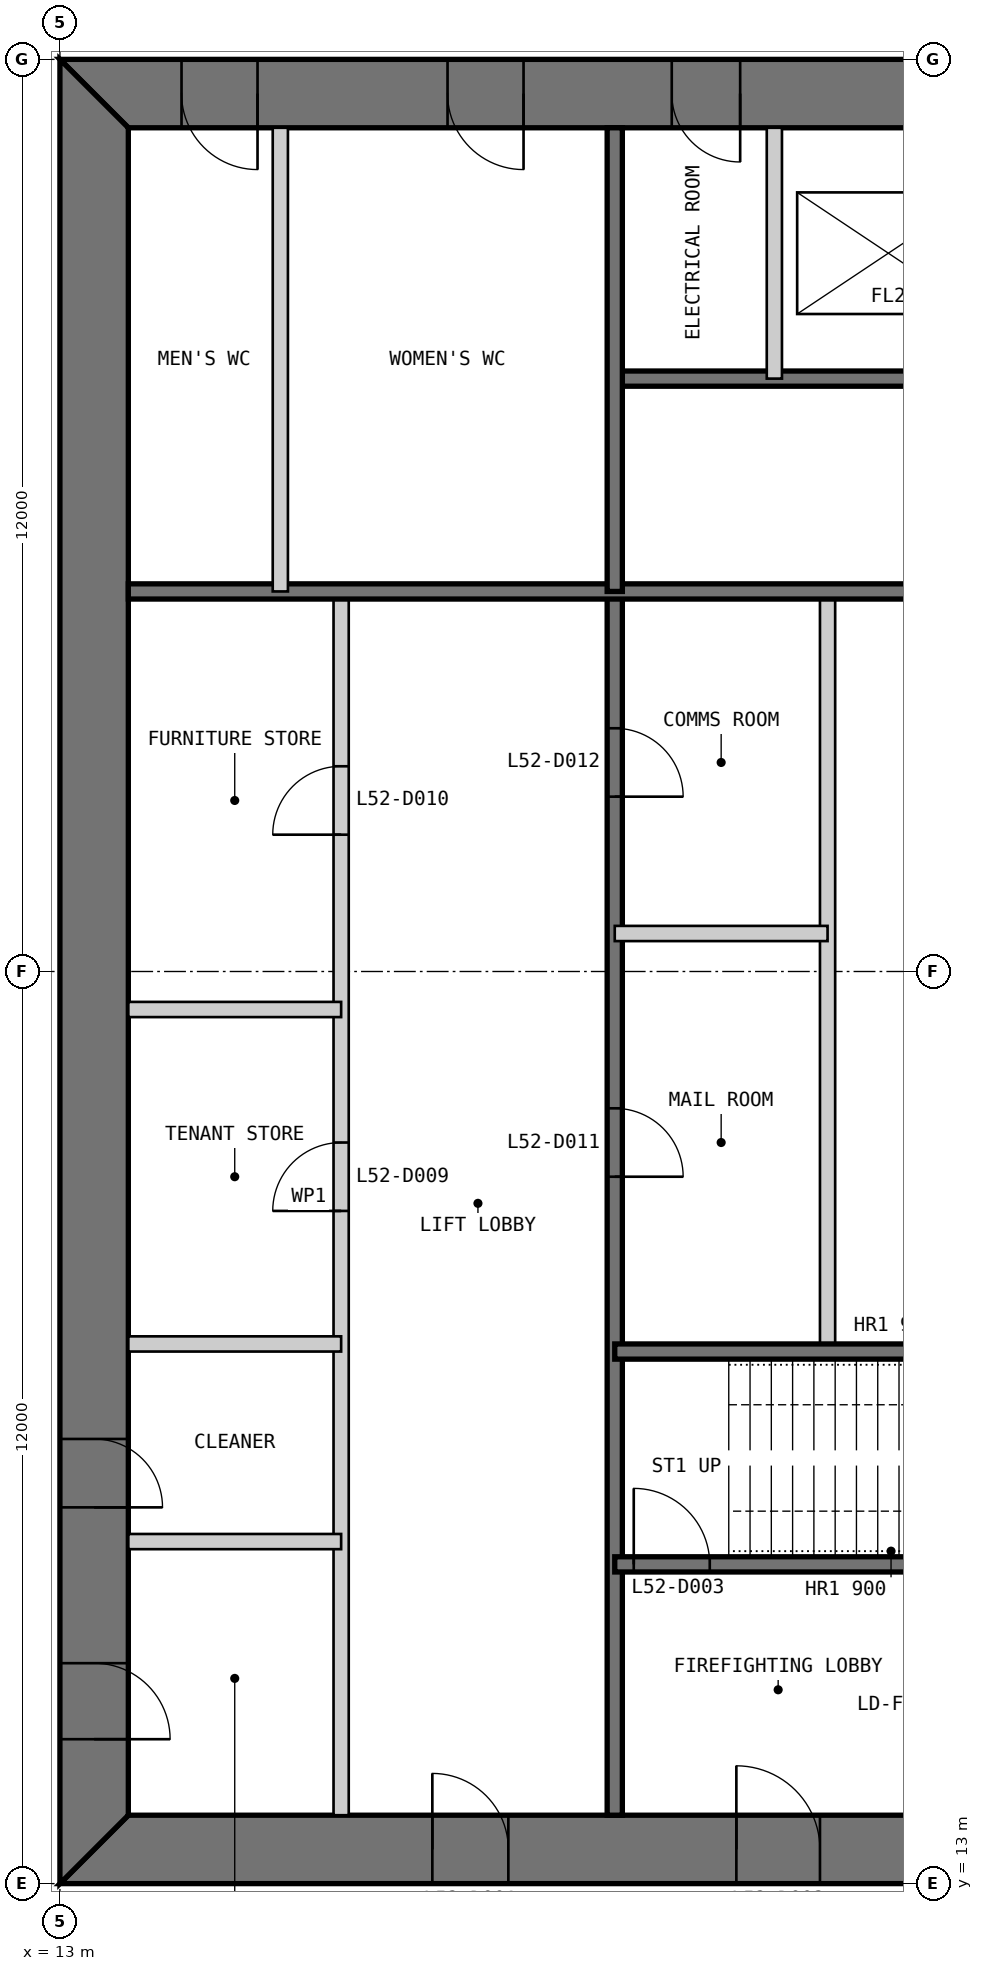
"""IFC4 building model, lengths in metres.
Left out: names, types, materials, properties, quantities, classifications, styles, units other than length and angle.
Written with IfcOpenShell. Run it as: python <this file> out.ifc"""

import sys

from ifc_helpers import new_model, si_unit, direction, frame, frame_2d, origin, place, context, subcontext, project, spatial, polyline, rectangle, outline, extrude, element, fill, save


model = new_model("IFC4")
c1 = context("Model", 3, precision=1e-05, world=origin(), true_north=direction((0.0, 1.0)))
c2 = subcontext(c1, "Body", "Model", "MODEL_VIEW")
j1 = project(units=[si_unit("LENGTHUNIT", "METRE"), si_unit("PLANEANGLEUNIT", "RADIAN")], contexts=[c1])
p1 = place(None, origin())
s1 = spatial("IfcSite", under=j1, at=p1, CompositionType="ELEMENT")
p2 = place(p1, origin())
s2 = spatial("IfcBuilding", under=s1, at=p2, CompositionType="ELEMENT")
p3 = place(p2, frame((0.0, 0.0, 221.8)))
s3 = spatial("IfcBuildingStorey", under=s2, at=p3, CompositionType="ELEMENT", Elevation=221.8)
p4 = place(p3, frame((13.0, 13.45, 0.0), z_axis=(0.0, 0.0, 1.0), x_axis=(1.0, 0.0, 0.0)))
e1 = element("IfcWall", 1, at=p4, inside=s3, PredefinedType="SHEAR", context=c2, shape_type="SweptSolid", body=[
    extrude(outline(polyline([(0.0, -0.45), (24.0, -0.45), (23.1, 0.45), (0.9, 0.45), (0.0, -0.45)])), origin(), (0.0, 0.0, 1.0), 4.0),
])
p5 = place(p4, frame((4.9, 0.0, 0.0)))
e2 = element("IfcOpeningElement", 2, at=p5, cuts=e1, PredefinedType="OPENING", context=c2, shape_type="SweptSolid", body=[
    extrude(rectangle(XDim=1.0, YDim=2.2, at=frame_2d((0.5, 1.1))), frame((0.0, 0.46, 0.0), z_axis=(0.0, -1.0, 0.0), x_axis=(1.0, 0.0, 0.0)), (0.0, 0.0, 1.0), 0.92),
])
p6 = place(p4, frame((8.9, 0.0, 0.0)))
e3 = element("IfcOpeningElement", 3, at=p6, cuts=e1, PredefinedType="OPENING", context=c2, shape_type="SweptSolid", body=[
    extrude(rectangle(XDim=1.1, YDim=2.2, at=frame_2d((0.55, 1.1))), frame((0.0, 0.46, 0.0), z_axis=(0.0, -1.0, 0.0), x_axis=(1.0, 0.0, 0.0)), (0.0, 0.0, 1.0), 0.92),
])
p7 = place(p4, frame((15.05, 0.0, 0.0)))
e4 = element("IfcOpeningElement", 4, at=p7, cuts=e1, PredefinedType="OPENING", context=c2, shape_type="SweptSolid", body=[
    extrude(rectangle(XDim=0.9, YDim=2.2, at=frame_2d((0.45, 1.1))), frame((0.0, 0.46, 0.0), z_axis=(0.0, -1.0, 0.0), x_axis=(1.0, 0.0, 0.0)), (0.0, 0.0, 1.0), 0.92),
])
p8 = place(p4, frame((17.9, 0.0, 0.0)))
e5 = element("IfcOpeningElement", 5, at=p8, cuts=e1, PredefinedType="OPENING", context=c2, shape_type="SweptSolid", body=[
    extrude(rectangle(XDim=1.0, YDim=2.2, at=frame_2d((0.5, 1.1))), frame((0.0, 0.46, 0.0), z_axis=(0.0, -1.0, 0.0), x_axis=(1.0, 0.0, 0.0)), (0.0, 0.0, 1.0), 0.92),
])
p9 = place(p4, frame((21.4, 0.0, 0.0)))
e6 = element("IfcOpeningElement", 6, at=p9, cuts=e1, PredefinedType="OPENING", context=c2, shape_type="SweptSolid", body=[
    extrude(rectangle(XDim=1.0, YDim=2.2, at=frame_2d((0.5, 1.1))), frame((0.0, 0.46, 0.0), z_axis=(0.0, -1.0, 0.0), x_axis=(1.0, 0.0, 0.0)), (0.0, 0.0, 1.0), 0.92),
])
p10 = place(p3, frame((37.0, 36.55, 0.0), z_axis=(0.0, 0.0, 1.0), x_axis=(-1.0, 0.0, 0.0)))
e7 = element("IfcWall", 7, at=p10, inside=s3, PredefinedType="SHEAR", context=c2, shape_type="SweptSolid", body=[
    extrude(outline(polyline([(0.0, -0.45), (24.0, -0.45), (23.1, 0.45), (0.9, 0.45), (0.0, -0.45)])), origin(), (0.0, 0.0, 1.0), 4.0),
])
p11 = place(p10, frame((4.9, 0.0, 0.0)))
e8 = element("IfcOpeningElement", 8, at=p11, cuts=e7, PredefinedType="OPENING", context=c2, shape_type="SweptSolid", body=[
    extrude(rectangle(XDim=1.0, YDim=2.2, at=frame_2d((0.5, 1.1))), frame((0.0, 0.46, 0.0), z_axis=(0.0, -1.0, 0.0), x_axis=(1.0, 0.0, 0.0)), (0.0, 0.0, 1.0), 0.92),
])
p12 = place(p10, frame((8.9, 0.0, 0.0)))
e9 = element("IfcOpeningElement", 9, at=p12, cuts=e7, PredefinedType="OPENING", context=c2, shape_type="SweptSolid", body=[
    extrude(rectangle(XDim=1.1, YDim=2.2, at=frame_2d((0.55, 1.1))), frame((0.0, 0.46, 0.0), z_axis=(0.0, -1.0, 0.0), x_axis=(1.0, 0.0, 0.0)), (0.0, 0.0, 1.0), 0.92),
])
p13 = place(p10, frame((15.05, 0.0, 0.0)))
e10 = element("IfcOpeningElement", 10, at=p13, cuts=e7, PredefinedType="OPENING", context=c2, shape_type="SweptSolid", body=[
    extrude(rectangle(XDim=0.9, YDim=2.2, at=frame_2d((0.45, 1.1))), frame((0.0, 0.46, 0.0), z_axis=(0.0, -1.0, 0.0), x_axis=(1.0, 0.0, 0.0)), (0.0, 0.0, 1.0), 0.92),
])
p14 = place(p10, frame((17.9, 0.0, 0.0)))
e11 = element("IfcOpeningElement", 11, at=p14, cuts=e7, PredefinedType="OPENING", context=c2, shape_type="SweptSolid", body=[
    extrude(rectangle(XDim=1.0, YDim=2.2, at=frame_2d((0.5, 1.1))), frame((0.0, 0.46, 0.0), z_axis=(0.0, -1.0, 0.0), x_axis=(1.0, 0.0, 0.0)), (0.0, 0.0, 1.0), 0.92),
])
p15 = place(p10, frame((21.4, 0.0, 0.0)))
e12 = element("IfcOpeningElement", 12, at=p15, cuts=e7, PredefinedType="OPENING", context=c2, shape_type="SweptSolid", body=[
    extrude(rectangle(XDim=1.0, YDim=2.2, at=frame_2d((0.5, 1.1))), frame((0.0, 0.46, 0.0), z_axis=(0.0, -1.0, 0.0), x_axis=(1.0, 0.0, 0.0)), (0.0, 0.0, 1.0), 0.92),
])
p16 = place(p3, frame((13.45, 36.1, 0.0), z_axis=(0.0, 0.0, 1.0), x_axis=(0.0, -1.0, 0.0)))
e13 = element("IfcWall", 13, at=p16, inside=s3, PredefinedType="SHEAR", context=c2, shape_type="SweptSolid", body=[
    extrude(outline(polyline([(-0.9, -0.45), (23.1, -0.45), (22.2, 0.45), (0.0, 0.45), (-0.9, -0.45)])), origin(), (0.0, 0.0, 1.0), 4.0),
])
p17 = place(p16, frame((20.2, 0.0, 0.0)))
e14 = element("IfcOpeningElement", 14, at=p17, cuts=e13, PredefinedType="OPENING", context=c2, shape_type="SweptSolid", body=[
    extrude(rectangle(XDim=1.0, YDim=2.2, at=frame_2d((0.5, 1.1))), frame((0.0, 0.46, 0.0), z_axis=(0.0, -1.0, 0.0), x_axis=(1.0, 0.0, 0.0)), (0.0, 0.0, 1.0), 0.92),
])
p18 = place(p16, frame((17.25, 0.0, 0.0)))
e15 = element("IfcOpeningElement", 15, at=p18, cuts=e13, PredefinedType="OPENING", context=c2, shape_type="SweptSolid", body=[
    extrude(rectangle(XDim=0.9, YDim=2.2, at=frame_2d((0.45, 1.1))), frame((0.0, 0.46, 0.0), z_axis=(0.0, -1.0, 0.0), x_axis=(1.0, 0.0, 0.0)), (0.0, 0.0, 1.0), 0.92),
])
p19 = place(p3, frame((16.7, 13.9, 0.0), z_axis=(0.0, 0.0, 1.0), x_axis=(0.0, 1.0, 0.0)))
e16 = element("IfcWall", 16, at=p19, inside=s3, PredefinedType="PARTITIONING", context=c2, shape_type="SweptSolid", body=[
    extrude(rectangle(XDim=16.1, YDim=0.2, at=frame_2d((8.05, 0.0))), origin(), (0.0, 0.0, 1.0), 3.8),
])
p20 = place(p19, frame((7.95, 0.0, 0.0)))
e17 = element("IfcOpeningElement", 17, at=p20, cuts=e16, PredefinedType="OPENING", context=c2, shape_type="SweptSolid", body=[
    extrude(rectangle(XDim=0.9, YDim=2.2, at=frame_2d((0.45, 1.1))), frame((0.0, 0.11, 0.0), z_axis=(0.0, -1.0, 0.0), x_axis=(1.0, 0.0, 0.0)), (0.0, 0.0, 1.0), 0.22),
])
p21 = place(p19, frame((12.9, 0.0, 0.0)))
e18 = element("IfcOpeningElement", 18, at=p21, cuts=e16, PredefinedType="OPENING", context=c2, shape_type="SweptSolid", body=[
    extrude(rectangle(XDim=0.9, YDim=2.2, at=frame_2d((0.45, 1.1))), frame((0.0, 0.11, 0.0), z_axis=(0.0, -1.0, 0.0), x_axis=(1.0, 0.0, 0.0)), (0.0, 0.0, 1.0), 0.22),
])
p22 = place(p3, frame((20.3, 13.9, 0.0), z_axis=(0.0, 0.0, 1.0), x_axis=(0.0, 1.0, 0.0)))
e19 = element("IfcWall", 19, at=p22, inside=s3, PredefinedType="SOLIDWALL", context=c2, shape_type="SweptSolid", body=[
    extrude(rectangle(XDim=16.1, YDim=0.2, at=frame_2d((8.05, 0.0))), origin(), (0.0, 0.0, 1.0), 3.8),
])
p23 = place(p22, frame((8.4, 0.0, 0.0)))
e20 = element("IfcOpeningElement", 20, at=p23, cuts=e19, PredefinedType="OPENING", context=c2, shape_type="SweptSolid", body=[
    extrude(rectangle(XDim=0.9, YDim=2.2, at=frame_2d((0.45, 1.1))), frame((0.0, 0.11, 0.0), z_axis=(0.0, -1.0, 0.0), x_axis=(1.0, 0.0, 0.0)), (0.0, 0.0, 1.0), 0.22),
])
p24 = place(p22, frame((13.4, 0.0, 0.0)))
e21 = element("IfcOpeningElement", 21, at=p24, cuts=e19, PredefinedType="OPENING", context=c2, shape_type="SweptSolid", body=[
    extrude(rectangle(XDim=0.9, YDim=2.2, at=frame_2d((0.45, 1.1))), frame((0.0, 0.11, 0.0), z_axis=(0.0, -1.0, 0.0), x_axis=(1.0, 0.0, 0.0)), (0.0, 0.0, 1.0), 0.22),
])
p25 = place(p3, frame((23.1, 20.0, 0.0), z_axis=(0.0, 0.0, 1.0), x_axis=(0.0, 1.0, 0.0)))
e22 = element("IfcWall", 22, at=p25, inside=s3, PredefinedType="PARTITIONING", context=c2, shape_type="SweptSolid", body=[
    extrude(rectangle(XDim=10.0, YDim=0.2, at=frame_2d((5.0, 0.0))), origin(), (0.0, 0.0, 1.0), 3.8),
])
p26 = place(p3, frame((20.3, 17.2, 0.0), z_axis=(0.0, 0.0, 1.0), x_axis=(1.0, 0.0, 0.0)))
e23 = element("IfcWall", 23, at=p26, inside=s3, PredefinedType="SOLIDWALL", context=c2, shape_type="SweptSolid", body=[
    extrude(rectangle(XDim=9.4, YDim=0.2, at=frame_2d((4.7, 0.0))), origin(), (0.0, 0.0, 1.0), 3.8),
])
p27 = place(p26, frame((0.25, 0.0, 0.0)))
e24 = element("IfcOpeningElement", 24, at=p27, cuts=e23, PredefinedType="OPENING", context=c2, shape_type="SweptSolid", body=[
    extrude(rectangle(XDim=1.0, YDim=2.2, at=frame_2d((0.5, 1.1))), frame((0.0, 0.11, 0.0), z_axis=(0.0, -1.0, 0.0), x_axis=(1.0, 0.0, 0.0)), (0.0, 0.0, 1.0), 0.22),
])
p28 = place(p3, frame((20.3, 20.0, 0.0), z_axis=(0.0, 0.0, 1.0), x_axis=(1.0, 0.0, 0.0)))
e25 = element("IfcWall", 25, at=p28, inside=s3, PredefinedType="SOLIDWALL", context=c2, shape_type="SweptSolid", body=[
    extrude(rectangle(XDim=15.8, YDim=0.2, at=frame_2d((7.9, 0.0))), origin(), (0.0, 0.0, 1.0), 3.8),
])
for number, where, z_axis, x_axis in (
    (26, (13.9, 17.5, 0.0), (0.0, 0.0, 1.0), (1.0, 0.0, 0.0)),
    (27, (13.9, 20.1, 0.0), (0.0, 0.0, 1.0), (1.0, 0.0, 0.0)),
    (28, (13.9, 24.5, 0.0), (0.0, 0.0, 1.0), (1.0, 0.0, 0.0)),
    (29, (20.3, 25.5, 0.0), (0.0, 0.0, 1.0), (1.0, 0.0, 0.0)),
):
    element("IfcWall", number, at=place(p3, frame(where, z_axis=z_axis, x_axis=x_axis)), inside=s3, PredefinedType="PARTITIONING", context=c2, shape_type="SweptSolid", body=[
        extrude(rectangle(XDim=2.8, YDim=0.2, at=frame_2d((1.4, 0.0))), origin(), (0.0, 0.0, 1.0), 3.8),
    ])
p29 = place(p3, frame((29.7, 32.8, 0.0), z_axis=(0.0, 0.0, 1.0), x_axis=(-1.0, 0.0, 0.0)))
e30 = element("IfcWall", 30, at=p29, inside=s3, PredefinedType="SOLIDWALL", context=c2, shape_type="SweptSolid", body=[
    extrude(rectangle(XDim=9.4, YDim=0.2, at=frame_2d((4.7, 0.0))), origin(), (0.0, 0.0, 1.0), 3.8),
])
p30 = place(p29, frame((0.25, 0.0, 0.0)))
e31 = element("IfcOpeningElement", 31, at=p30, cuts=e30, PredefinedType="OPENING", context=c2, shape_type="SweptSolid", body=[
    extrude(rectangle(XDim=1.0, YDim=2.2, at=frame_2d((0.5, 1.1))), frame((0.0, 0.11, 0.0), z_axis=(0.0, -1.0, 0.0), x_axis=(1.0, 0.0, 0.0)), (0.0, 0.0, 1.0), 0.22),
])
p31 = place(p3, frame((29.7, 30.0, 0.0), z_axis=(0.0, 0.0, 1.0), x_axis=(-1.0, 0.0, 0.0)))
e32 = element("IfcWall", 32, at=p31, inside=s3, PredefinedType="SOLIDWALL", context=c2, shape_type="SweptSolid", body=[
    extrude(rectangle(XDim=15.8, YDim=0.2, at=frame_2d((7.9, 0.0))), origin(), (0.0, 0.0, 1.0), 3.8),
])
p32 = place(p3, frame((22.4, 36.1, 0.0), z_axis=(0.0, 0.0, 1.0), x_axis=(0.0, -1.0, 0.0)))
e33 = element("IfcWall", 33, at=p32, inside=s3, PredefinedType="PARTITIONING", context=c2, shape_type="SweptSolid", body=[
    extrude(rectangle(XDim=3.3, YDim=0.2, at=frame_2d((1.65, 0.0))), origin(), (0.0, 0.0, 1.0), 3.8),
])
p33 = place(p3, frame((20.3, 36.1, 0.0), z_axis=(0.0, 0.0, 1.0), x_axis=(0.0, -1.0, 0.0)))
e34 = element("IfcWall", 34, at=p33, inside=s3, PredefinedType="SOLIDWALL", context=c2, shape_type="SweptSolid", body=[
    extrude(rectangle(XDim=6.1, YDim=0.2, at=frame_2d((3.05, 0.0))), origin(), (0.0, 0.0, 1.0), 3.8),
])
p34 = place(p3, frame((15.9, 36.1, 0.0), z_axis=(0.0, 0.0, 1.0), x_axis=(0.0, -1.0, 0.0)))
e35 = element("IfcWall", 35, at=p34, inside=s3, PredefinedType="PARTITIONING", context=c2, shape_type="SweptSolid", body=[
    extrude(rectangle(XDim=6.1, YDim=0.2, at=frame_2d((3.05, 0.0))), origin(), (0.0, 0.0, 1.0), 3.8),
])
p35 = place(p5, origin())
e36 = element("IfcDoor", 36, at=p35, inside=s3, OperationType="SINGLE_SWING_LEFT", PredefinedType="DOOR", context=c2, shape_type="SweptSolid", body=[
    extrude(rectangle(XDim=1.0, YDim=2.2, at=frame_2d((0.5, 1.1))), frame((0.0, 0.025, 0.0), z_axis=(0.0, -1.0, 0.0), x_axis=(1.0, 0.0, 0.0)), (0.0, 0.0, 1.0), 0.05),
    extrude(outline(polyline([(0.0, 0.0), (0.04, 0.0), (0.04, 2.16), (0.96, 2.16), (0.96, 0.0), (1.0, 0.0), (1.0, 2.2), (0.0, 2.2), (0.0, 0.0)])), frame((0.0, 0.3, 0.0), z_axis=(0.0, -1.0, 0.0), x_axis=(1.0, 0.0, 0.0)), (0.0, 0.0, 1.0), 0.6),
])
fill(e2, e36)
p36 = place(p6, origin())
e37 = element("IfcDoor", 37, at=p36, inside=s3, OperationType="SINGLE_SWING_LEFT", PredefinedType="DOOR", context=c2, shape_type="SweptSolid", body=[
    extrude(rectangle(XDim=1.1, YDim=2.2, at=frame_2d((0.55, 1.1))), frame((0.0, 0.025, 0.0), z_axis=(0.0, -1.0, 0.0), x_axis=(1.0, 0.0, 0.0)), (0.0, 0.0, 1.0), 0.05),
    extrude(outline(polyline([(0.0, 0.0), (0.04, 0.0), (0.04, 2.16), (1.06, 2.16), (1.06, 0.0), (1.1, 0.0), (1.1, 2.2), (0.0, 2.2), (0.0, 0.0)])), frame((0.0, 0.3, 0.0), z_axis=(0.0, -1.0, 0.0), x_axis=(1.0, 0.0, 0.0)), (0.0, 0.0, 1.0), 0.6),
])
fill(e3, e37)
p37 = place(p27, origin())
e38 = element("IfcDoor", 38, at=p37, inside=s3, OperationType="SINGLE_SWING_LEFT", PredefinedType="DOOR", context=c2, shape_type="SweptSolid", body=[
    extrude(rectangle(XDim=1.0, YDim=2.2, at=frame_2d((0.5, 1.1))), frame((0.0, 0.025, 0.0), z_axis=(0.0, -1.0, 0.0), x_axis=(1.0, 0.0, 0.0)), (0.0, 0.0, 1.0), 0.05),
])
fill(e24, e38)
p38 = place(p17, origin())
e39 = element("IfcDoor", 39, at=p38, inside=s3, OperationType="SINGLE_SWING_RIGHT", PredefinedType="DOOR", context=c2, shape_type="SweptSolid", body=[
    extrude(rectangle(XDim=1.0, YDim=2.2, at=frame_2d((0.5, 1.1))), frame((0.0, 0.025, 0.0), z_axis=(0.0, -1.0, 0.0), x_axis=(1.0, 0.0, 0.0)), (0.0, 0.0, 1.0), 0.05),
    extrude(outline(polyline([(0.0, 0.0), (0.04, 0.0), (0.04, 2.16), (0.96, 2.16), (0.96, 0.0), (1.0, 0.0), (1.0, 2.2), (0.0, 2.2), (0.0, 0.0)])), frame((0.0, 0.3, 0.0), z_axis=(0.0, -1.0, 0.0), x_axis=(1.0, 0.0, 0.0)), (0.0, 0.0, 1.0), 0.6),
])
fill(e14, e39)
p39 = place(p18, origin())
e40 = element("IfcDoor", 40, at=p39, inside=s3, OperationType="SINGLE_SWING_RIGHT", PredefinedType="DOOR", context=c2, shape_type="SweptSolid", body=[
    extrude(rectangle(XDim=0.9, YDim=2.2, at=frame_2d((0.45, 1.1))), frame((0.0, 0.025, 0.0), z_axis=(0.0, -1.0, 0.0), x_axis=(1.0, 0.0, 0.0)), (0.0, 0.0, 1.0), 0.05),
    extrude(outline(polyline([(0.0, 0.0), (0.04, 0.0), (0.04, 2.16), (0.86, 2.16), (0.86, 0.0), (0.9, 0.0), (0.9, 2.2), (0.0, 2.2), (0.0, 0.0)])), frame((0.0, 0.3, 0.0), z_axis=(0.0, -1.0, 0.0), x_axis=(1.0, 0.0, 0.0)), (0.0, 0.0, 1.0), 0.6),
])
fill(e15, e40)
p40 = place(p20, origin())
e41 = element("IfcDoor", 41, at=p40, inside=s3, OperationType="SINGLE_SWING_LEFT", PredefinedType="DOOR", context=c2, shape_type="SweptSolid", body=[
    extrude(rectangle(XDim=0.9, YDim=2.2, at=frame_2d((0.45, 1.1))), frame((0.0, 0.025, 0.0), z_axis=(0.0, -1.0, 0.0), x_axis=(1.0, 0.0, 0.0)), (0.0, 0.0, 1.0), 0.05),
])
fill(e17, e41)
p41 = place(p21, origin())
e42 = element("IfcDoor", 42, at=p41, inside=s3, OperationType="SINGLE_SWING_LEFT", PredefinedType="DOOR", context=c2, shape_type="SweptSolid", body=[
    extrude(rectangle(XDim=0.9, YDim=2.2, at=frame_2d((0.45, 1.1))), frame((0.0, 0.025, 0.0), z_axis=(0.0, -1.0, 0.0), x_axis=(1.0, 0.0, 0.0)), (0.0, 0.0, 1.0), 0.05),
])
fill(e18, e42)
p42 = place(p23, frame((0.9, 0.0, 0.0), z_axis=(0.0, 0.0, 1.0), x_axis=(-1.0, 0.0, 0.0)))
e43 = element("IfcDoor", 43, at=p42, inside=s3, OperationType="SINGLE_SWING_RIGHT", PredefinedType="DOOR", context=c2, shape_type="SweptSolid", body=[
    extrude(rectangle(XDim=0.9, YDim=2.2, at=frame_2d((0.45, 1.1))), frame((0.0, 0.025, 0.0), z_axis=(0.0, -1.0, 0.0), x_axis=(1.0, 0.0, 0.0)), (0.0, 0.0, 1.0), 0.05),
])
fill(e20, e43)
p43 = place(p24, frame((0.9, 0.0, 0.0), z_axis=(0.0, 0.0, 1.0), x_axis=(-1.0, 0.0, 0.0)))
e44 = element("IfcDoor", 44, at=p43, inside=s3, OperationType="SINGLE_SWING_RIGHT", PredefinedType="DOOR", context=c2, shape_type="SweptSolid", body=[
    extrude(rectangle(XDim=0.9, YDim=2.2, at=frame_2d((0.45, 1.1))), frame((0.0, 0.025, 0.0), z_axis=(0.0, -1.0, 0.0), x_axis=(1.0, 0.0, 0.0)), (0.0, 0.0, 1.0), 0.05),
])
fill(e21, e44)
p44 = place(p13, origin())
e45 = element("IfcDoor", 45, at=p44, inside=s3, OperationType="SINGLE_SWING_LEFT", PredefinedType="DOOR", context=c2, shape_type="SweptSolid", body=[
    extrude(rectangle(XDim=0.9, YDim=2.2, at=frame_2d((0.45, 1.1))), frame((0.0, 0.025, 0.0), z_axis=(0.0, -1.0, 0.0), x_axis=(1.0, 0.0, 0.0)), (0.0, 0.0, 1.0), 0.05),
    extrude(outline(polyline([(0.0, 0.0), (0.04, 0.0), (0.04, 2.16), (0.86, 2.16), (0.86, 0.0), (0.9, 0.0), (0.9, 2.2), (0.0, 2.2), (0.0, 0.0)])), frame((0.0, 0.3, 0.0), z_axis=(0.0, -1.0, 0.0), x_axis=(1.0, 0.0, 0.0)), (0.0, 0.0, 1.0), 0.6),
])
fill(e10, e45)
p45 = place(p14, origin())
e46 = element("IfcDoor", 46, at=p45, inside=s3, OperationType="SINGLE_SWING_LEFT", PredefinedType="DOOR", context=c2, shape_type="SweptSolid", body=[
    extrude(rectangle(XDim=1.0, YDim=2.2, at=frame_2d((0.5, 1.1))), frame((0.0, 0.025, 0.0), z_axis=(0.0, -1.0, 0.0), x_axis=(1.0, 0.0, 0.0)), (0.0, 0.0, 1.0), 0.05),
    extrude(outline(polyline([(0.0, 0.0), (0.04, 0.0), (0.04, 2.16), (0.96, 2.16), (0.96, 0.0), (1.0, 0.0), (1.0, 2.2), (0.0, 2.2), (0.0, 0.0)])), frame((0.0, 0.3, 0.0), z_axis=(0.0, -1.0, 0.0), x_axis=(1.0, 0.0, 0.0)), (0.0, 0.0, 1.0), 0.6),
])
fill(e11, e46)
p46 = place(p15, origin())
e47 = element("IfcDoor", 47, at=p46, inside=s3, OperationType="SINGLE_SWING_LEFT", PredefinedType="DOOR", context=c2, shape_type="SweptSolid", body=[
    extrude(rectangle(XDim=1.0, YDim=2.2, at=frame_2d((0.5, 1.1))), frame((0.0, 0.025, 0.0), z_axis=(0.0, -1.0, 0.0), x_axis=(1.0, 0.0, 0.0)), (0.0, 0.0, 1.0), 0.05),
    extrude(outline(polyline([(0.0, 0.0), (0.04, 0.0), (0.04, 2.16), (0.96, 2.16), (0.96, 0.0), (1.0, 0.0), (1.0, 2.2), (0.0, 2.2), (0.0, 0.0)])), frame((0.0, 0.3, 0.0), z_axis=(0.0, -1.0, 0.0), x_axis=(1.0, 0.0, 0.0)), (0.0, 0.0, 1.0), 0.6),
])
fill(e12, e47)
save(model, sys.argv[1])
